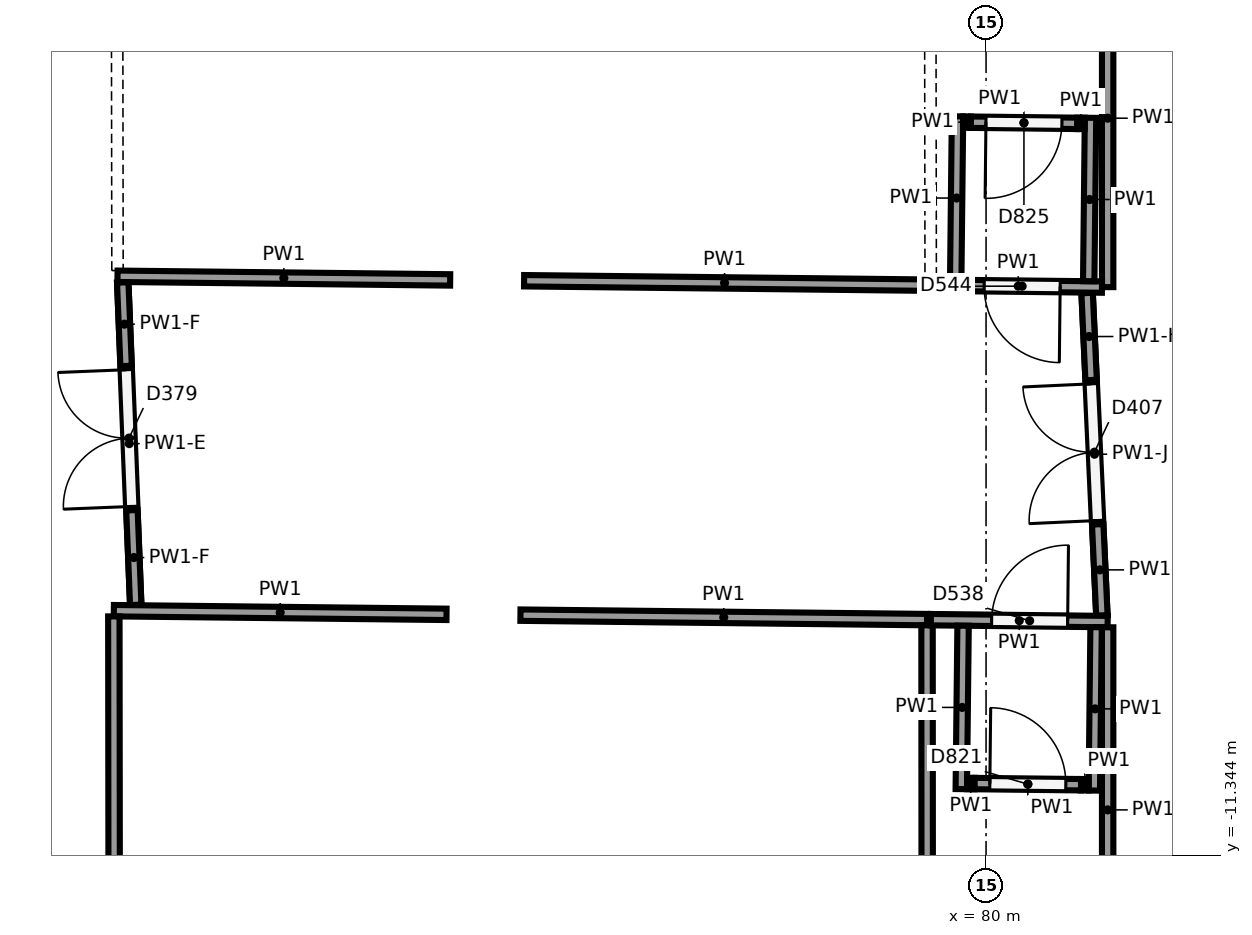
"""IFC4 building model, lengths in metres.
Left out: names, types, materials, properties, quantities, classifications, styles, units other than length and angle.
Written with IfcOpenShell. Run it as: python <this file> out.ifc"""

import sys

from ifc_helpers import new_model, si_unit, direction, frame, frame_2d, origin, origin_2d, place, context, subcontext, project, spatial, rectangle, circle, extrude, element, fill, save


model = new_model("IFC4")
c1 = context("Model", 3, precision=1e-05, world=origin(), true_north=direction((0.0, 1.0)))
c2 = subcontext(c1, "Body", "Model", "MODEL_VIEW")
j1 = project(units=[si_unit("LENGTHUNIT", "METRE"), si_unit("PLANEANGLEUNIT", "RADIAN")], contexts=[c1])
p1 = place(None, origin())
s1 = spatial("IfcSite", under=j1, at=p1, CompositionType="ELEMENT")
p2 = place(p1, origin())
s2 = spatial("IfcBuilding", under=s1, at=p2, CompositionType="ELEMENT")
p3 = place(p2, origin())
s3 = spatial("IfcBuildingStorey", under=s2, at=p3, CompositionType="ELEMENT", Elevation=0.0)
p4 = place(p3, frame((73.498, -5.981, 0.0), z_axis=(0.0, 0.0, 1.0), x_axis=(1.0, 0.0, 0.0)))
e1 = element("IfcColumn", 1, at=p4, inside=s3, PredefinedType="COLUMN", context=c2, shape_type="SweptSolid", body=[
    extrude(circle(Radius=0.45, at=origin_2d()), origin(), (0.0, 0.0, 1.0), 6.5),
])
p5 = place(p3, frame((68.524, -8.127, 0.0), z_axis=(0.0, 0.0, 1.0), x_axis=(0.999940244273, -0.01093196608, 0.0)))
e2 = element("IfcWall", 2, at=p5, inside=s3, PredefinedType="PARTITIONING", context=c2, shape_type="SweptSolid", body=[
    extrude(rectangle(XDim=4.377, YDim=0.15, at=frame_2d((2.188, 0.0))), origin(), (0.0, 0.0, 1.0), 6.15),
])
p6 = place(p3, frame((73.874, -8.186, 0.0), z_axis=(0.0, 0.0, 1.0), x_axis=(0.999939527069, -0.010997372611, 0.0)))
e3 = element("IfcWall", 3, at=p6, inside=s3, PredefinedType="PARTITIONING", context=c2, shape_type="SweptSolid", body=[
    extrude(rectangle(XDim=5.35, YDim=0.15, at=frame_2d((2.675, 0.0))), origin(), (0.0, 0.0, 1.0), 6.15),
])
p7 = place(p3, frame((79.224, -8.319, 0.0), z_axis=(0.0, 0.0, 1.0), x_axis=(0.00057636878, -0.9999998339, 0.0)))
e4 = element("IfcWall", 4, at=p7, inside=s3, PredefinedType="PARTITIONING", context=c2, shape_type="SweptSolid", body=[
    extrude(rectangle(XDim=9.319, YDim=0.15, at=frame_2d((4.659, 0.0))), origin(), (0.0, 0.0, 1.0), 6.15),
])
p8 = place(p3, frame((68.535, -17.298, 0.0), z_axis=(0.0, 0.0, 1.0), x_axis=(-0.001127273963, 0.999999364627, 0.0)))
e5 = element("IfcWall", 5, at=p8, inside=s3, PredefinedType="PARTITIONING", context=c2, shape_type="SweptSolid", body=[
    extrude(rectangle(XDim=9.096, YDim=0.15, at=frame_2d((4.548, 0.0))), origin(), (0.0, 0.0, 1.0), 6.15),
])
p9 = place(p3, frame((79.274, -8.245, 0.0), z_axis=(0.0, 0.0, 1.0), x_axis=(0.999940447056, -0.010913401878, 0.0)))
e6 = element("IfcWall", 6, at=p9, inside=s3, PredefinedType="PARTITIONING", context=c2, shape_type="SweptSolid", body=[
    extrude(rectangle(XDim=2.327, YDim=0.15, at=frame_2d((1.163, 0.0))), origin(), (0.0, 0.0, 1.0), 6.15),
])
p10 = place(p9, frame((0.8, 0.0, 0.0)))
e7 = element("IfcOpeningElement", 7, at=p10, cuts=e6, PredefinedType="OPENING", context=c2, shape_type="SweptSolid", body=[
    extrude(rectangle(XDim=1.0, YDim=2.1, at=frame_2d((0.5, 1.05))), frame((0.0, 0.085, 0.0), z_axis=(0.0, -1.0, 0.0), x_axis=(1.0, 0.0, 0.0)), (0.0, 0.0, 1.0), 0.17),
])
p11 = place(p3, frame((81.6, -8.345, 0.0), z_axis=(0.0, 0.0, 1.0), x_axis=(0.0, -1.0, 0.0)))
e8 = element("IfcWall", 8, at=p11, inside=s3, PredefinedType="PARTITIONING", context=c2, shape_type="SweptSolid", body=[
    extrude(rectangle(XDim=4.805, YDim=0.15, at=frame_2d((2.402, 0.0))), origin(), (0.0, 0.0, 1.0), 6.15),
])
p12 = place(p3, frame((79.258, 5.522, 0.0), z_axis=(0.0, 0.0, 1.0), x_axis=(0.001459586112, -0.999998934804, 0.0)))
e9 = element("IfcWall", 9, at=p12, inside=s3, PredefinedType="PARTITIONING", context=c2, shape_type="SweptSolid", body=[
    extrude(rectangle(XDim=9.367, YDim=0.15, at=frame_2d((4.684, 0.0))), origin(), (0.0, 0.0, 1.0), 6.15),
])
p13 = place(p3, frame((79.197, -3.844, 0.0), z_axis=(0.0, 0.0, 1.0), x_axis=(-0.999939838458, 0.010969022991, 0.0)))
e10 = element("IfcWall", 10, at=p13, inside=s3, PredefinedType="PARTITIONING", context=c2, shape_type="SweptSolid", body=[
    extrude(rectangle(XDim=5.275, YDim=0.15, at=frame_2d((2.637, 0.0))), origin(), (0.0, 0.0, 1.0), 6.15),
])
p14 = place(p3, frame((72.949, -3.775, 0.0), z_axis=(0.0, 0.0, 1.0), x_axis=(-0.999940244273, 0.01093196608, 0.0)))
e11 = element("IfcWall", 11, at=p14, inside=s3, PredefinedType="PARTITIONING", context=c2, shape_type="SweptSolid", body=[
    extrude(rectangle(XDim=4.377, YDim=0.15, at=frame_2d((2.188, 0.0))), origin(), (0.0, 0.0, 1.0), 6.15),
])
p15 = place(p3, frame((68.572, -3.652, 0.0), z_axis=(0.0, 0.0, 1.0), x_axis=(-0.001395372441, 0.999999026467, 0.0)))
e12 = element("IfcWall", 12, at=p15, inside=s3, PredefinedType="PARTITIONING", context=c2, shape_type="SweptSolid", body=[
    extrude(rectangle(XDim=9.098, YDim=0.15, at=frame_2d((4.549, 0.0))), origin(), (0.0, 0.0, 1.0), 6.15),
])
p16 = place(p15, frame((3.95, 0.0, 0.0)))
e13 = element("IfcOpeningElement", 13, at=p16, cuts=e12, PredefinedType="OPENING", context=c2, shape_type="SweptSolid", body=[
    extrude(rectangle(XDim=1.0, YDim=2.1, at=frame_2d((0.5, 1.05))), frame((0.0, 0.085, 0.0), z_axis=(0.0, -1.0, 0.0), x_axis=(1.0, 0.0, 0.0)), (0.0, 0.0, 1.0), 0.17),
])
p17 = place(p3, frame((81.6, 0.575, 0.0), z_axis=(0.0, 0.0, 1.0), x_axis=(0.0, -1.0, 0.0)))
e14 = element("IfcWall", 14, at=p17, inside=s3, PredefinedType="PARTITIONING", context=c2, shape_type="SweptSolid", body=[
    extrude(rectangle(XDim=4.445, YDim=0.15, at=frame_2d((2.223, 0.0))), origin(), (0.0, 0.0, 1.0), 6.15),
])
p18 = place(p3, frame((81.525, -3.869, 0.0), z_axis=(0.0, 0.0, 1.0), x_axis=(-0.999941036186, 0.010859288735, 0.0)))
e15 = element("IfcWall", 15, at=p18, inside=s3, PredefinedType="PARTITIONING", context=c2, shape_type="SweptSolid", body=[
    extrude(rectangle(XDim=2.203, YDim=0.15, at=frame_2d((1.102, 0.0))), origin(), (0.0, 0.0, 1.0), 6.15),
])
p19 = place(p18, frame((0.55, 0.0, 0.0)))
e16 = element("IfcOpeningElement", 16, at=p19, cuts=e15, PredefinedType="OPENING", context=c2, shape_type="SweptSolid", body=[
    extrude(rectangle(XDim=1.0, YDim=2.1, at=frame_2d((0.5, 1.05))), frame((0.0, 0.085, 0.0), z_axis=(0.0, -1.0, 0.0), x_axis=(1.0, 0.0, 0.0)), (0.0, 0.0, 1.0), 0.17),
])
for number, where, z_axis, x_axis in (
    (17, (79.698, -8.324, 0.0), (0.0, 0.0, 1.0), (-0.011, -1.0, 0.0)),
    (18, (81.448, -8.344, 0.0), (0.0, 0.0, 1.0), (-0.011, -1.0, 0.0)),
):
    element("IfcWall", number, at=place(p3, frame(where, z_axis=z_axis, x_axis=x_axis)), inside=s3, PredefinedType="PARTITIONING", context=c2, shape_type="SweptSolid", body=[
        extrude(rectangle(XDim=2.15, YDim=0.15, at=frame_2d((1.075, 0.0))), origin(), (0.0, 0.0, 1.0), 6.15),
    ])
p20 = place(p3, frame((79.75, -10.4, 0.0), z_axis=(0.0, 0.0, 1.0), x_axis=(0.999952412677, -0.009755633294, 0.0)))
e19 = element("IfcWall", 19, at=p20, inside=s3, PredefinedType="PARTITIONING", context=c2, shape_type="SweptSolid", body=[
    extrude(rectangle(XDim=0.1, YDim=0.15, at=frame_2d((0.05, 0.0))), origin(), (0.0, 0.0, 1.0), 6.15),
])
p21 = place(p3, frame((79.85, -10.401, 0.0), z_axis=(0.0, 0.0, 1.0), x_axis=(0.999939647341, -0.010986431424, 0.0)))
e20 = element("IfcWall", 20, at=p21, inside=s3, PredefinedType="PARTITIONING", context=c2, shape_type="SweptSolid", body=[
    extrude(rectangle(XDim=1.4, YDim=0.15, at=frame_2d((0.7, 0.0))), origin(), (0.0, 0.0, 1.0), 6.15),
])
p22 = place(p21, frame((0.2, 0.0, 0.0)))
e21 = element("IfcOpeningElement", 21, at=p22, cuts=e20, PredefinedType="OPENING", context=c2, shape_type="SweptSolid", body=[
    extrude(rectangle(XDim=1.0, YDim=2.1, at=frame_2d((0.5, 1.05))), frame((0.0, 0.085, 0.0), z_axis=(0.0, -1.0, 0.0), x_axis=(1.0, 0.0, 0.0)), (0.0, 0.0, 1.0), 0.17),
])
p23 = place(p3, frame((81.25, -10.417, 0.0), z_axis=(0.0, 0.0, 1.0), x_axis=(0.999925283809, -0.012224025474, 0.0)))
e22 = element("IfcWall", 22, at=p23, inside=s3, PredefinedType="PARTITIONING", context=c2, shape_type="SweptSolid", body=[
    extrude(rectangle(XDim=0.1, YDim=0.15, at=frame_2d((0.05, 0.0))), origin(), (0.0, 0.0, 1.0), 6.15),
])
for number, where, z_axis, x_axis in (
    (23, (81.351, -3.792, 0.0), (0.0, 0.0, 1.0), (0.011, 1.0, 0.0)),
    (24, (79.601, -3.773, 0.0), (0.0, 0.0, 1.0), (0.011, 1.0, 0.0)),
):
    element("IfcWall", number, at=place(p3, frame(where, z_axis=z_axis, x_axis=x_axis)), inside=s3, PredefinedType="PARTITIONING", context=c2, shape_type="SweptSolid", body=[
        extrude(rectangle(XDim=2.15, YDim=0.15, at=frame_2d((1.075, 0.0))), origin(), (0.0, 0.0, 1.0), 6.15),
    ])
p24 = place(p3, frame((81.299, -1.717, 0.0), z_axis=(0.0, 0.0, 1.0), x_axis=(-0.999952412677, 0.009755633294, 0.0)))
e25 = element("IfcWall", 25, at=p24, inside=s3, PredefinedType="PARTITIONING", context=c2, shape_type="SweptSolid", body=[
    extrude(rectangle(XDim=0.1, YDim=0.15, at=frame_2d((0.05, 0.0))), origin(), (0.0, 0.0, 1.0), 6.15),
])
p25 = place(p3, frame((81.198, -1.716, 0.0), z_axis=(0.0, 0.0, 1.0), x_axis=(-0.999939647341, 0.010986431424, 0.0)))
e26 = element("IfcWall", 26, at=p25, inside=s3, PredefinedType="PARTITIONING", context=c2, shape_type="SweptSolid", body=[
    extrude(rectangle(XDim=1.4, YDim=0.15, at=frame_2d((0.7, 0.0))), origin(), (0.0, 0.0, 1.0), 6.15),
])
p26 = place(p25, frame((0.2, 0.0, 0.0)))
e27 = element("IfcOpeningElement", 27, at=p26, cuts=e26, PredefinedType="OPENING", context=c2, shape_type="SweptSolid", body=[
    extrude(rectangle(XDim=1.0, YDim=2.1, at=frame_2d((0.5, 1.05))), frame((0.0, 0.085, 0.0), z_axis=(0.0, -1.0, 0.0), x_axis=(1.0, 0.0, 0.0)), (0.0, 0.0, 1.0), 0.17),
])
p27 = place(p3, frame((79.799, -1.7, 0.0), z_axis=(0.0, 0.0, 1.0), x_axis=(-0.999952412677, 0.009755633294, 0.0)))
e28 = element("IfcWall", 28, at=p27, inside=s3, PredefinedType="PARTITIONING", context=c2, shape_type="SweptSolid", body=[
    extrude(rectangle(XDim=0.1, YDim=0.15, at=frame_2d((0.05, 0.0))), origin(), (0.0, 0.0, 1.0), 6.15),
])
p28 = place(p3, frame((81.524, -8.189, 0.0), z_axis=(0.0, 0.0, 1.0), x_axis=(-0.045764948474, 0.998952235841, 0.0)))
e29 = element("IfcWall", 29, at=p28, inside=s3, PredefinedType="PARTITIONING", context=c2, shape_type="SweptSolid", body=[
    extrude(rectangle(XDim=4.246, YDim=0.15, at=frame_2d((2.123, 0.0))), origin(), (0.0, 0.0, 1.0), 5.05),
])
p29 = place(p28, frame((1.25, 0.0, 0.0)))
e30 = element("IfcOpeningElement", 30, at=p29, cuts=e29, PredefinedType="OPENING", context=c2, shape_type="SweptSolid", body=[
    extrude(rectangle(XDim=1.8, YDim=2.1, at=frame_2d((0.9, 1.05))), frame((0.0, 0.085, 0.0), z_axis=(0.0, -1.0, 0.0), x_axis=(1.0, 0.0, 0.0)), (0.0, 0.0, 1.0), 0.17),
])
p30 = place(p3, frame((81.524, -8.189, 5.05), z_axis=(0.0, 0.0, 1.0), x_axis=(-0.045776808716, 0.998951692418, 0.0)))
e31 = element("IfcWall", 31, at=p30, inside=s3, PredefinedType="PARTITIONING", context=c2, shape_type="SweptSolid", body=[
    extrude(rectangle(XDim=1.2, YDim=0.15, at=frame_2d((0.6, 0.0))), origin(), (0.0, 0.0, 1.0), 1.1),
])
p31 = place(p3, frame((81.382, -5.093, 5.05), z_axis=(0.0, 0.0, 1.0), x_axis=(-0.045784382699, 0.998951345312, 0.0)))
e32 = element("IfcWall", 32, at=p31, inside=s3, PredefinedType="PARTITIONING", context=c2, shape_type="SweptSolid", body=[
    extrude(rectangle(XDim=1.146, YDim=0.15, at=frame_2d((0.573, 0.0))), origin(), (0.0, 0.0, 1.0), 1.1),
])
p32 = place(p3, frame((68.812, -8.05, 0.0), z_axis=(0.0, 0.0, 1.0), x_axis=(-0.040250488261, 0.99918962074, 0.0)))
e33 = element("IfcWall", 33, at=p32, inside=s3, PredefinedType="PARTITIONING", context=c2, shape_type="SweptSolid", body=[
    extrude(rectangle(XDim=4.246, YDim=0.15, at=frame_2d((2.123, 0.0))), origin(), (0.0, 0.0, 1.0), 5.25),
])
p33 = place(p32, frame((1.296, 0.0, 0.0)))
e34 = element("IfcOpeningElement", 34, at=p33, cuts=e33, PredefinedType="OPENING", context=c2, shape_type="SweptSolid", body=[
    extrude(rectangle(XDim=1.8, YDim=2.1, at=frame_2d((0.9, 1.05))), frame((0.0, 0.085, 0.0), z_axis=(0.0, -1.0, 0.0), x_axis=(1.0, 0.0, 0.0)), (0.0, 0.0, 1.0), 0.17),
])
p34 = place(p3, frame((68.686, -4.907, 5.25), z_axis=(0.0, 0.0, 1.0), x_axis=(-0.0401719, 0.999192783426, 0.0)))
e35 = element("IfcWall", 35, at=p34, inside=s3, PredefinedType="PARTITIONING", context=c2, shape_type="SweptSolid", body=[
    extrude(rectangle(XDim=1.1, YDim=0.15, at=frame_2d((0.55, 0.0))), origin(), (0.0, 0.0, 1.0), 0.9),
])
p35 = place(p3, frame((68.812, -8.05, 5.25), z_axis=(0.0, 0.0, 1.0), x_axis=(-0.040171508889, 0.99919279915, 0.0)))
e36 = element("IfcWall", 36, at=p35, inside=s3, PredefinedType="PARTITIONING", context=c2, shape_type="SweptSolid", body=[
    extrude(rectangle(XDim=1.246, YDim=0.15, at=frame_2d((0.623, 0.0))), origin(), (0.0, 0.0, 1.0), 0.9),
])
p36 = place(p10, origin())
e37 = element("IfcDoor", 37, at=p36, inside=s3, OperationType="SINGLE_SWING_RIGHT", PredefinedType="DOOR", context=c2, shape_type="SweptSolid", body=[
    extrude(rectangle(XDim=1.0, YDim=2.1, at=frame_2d((0.5, 1.05))), frame((0.0, 0.025, 0.0), z_axis=(0.0, -1.0, 0.0), x_axis=(1.0, 0.0, 0.0)), (0.0, 0.0, 1.0), 0.05),
])
fill(e7, e37)
p37 = place(p19, origin())
e38 = element("IfcDoor", 38, at=p37, inside=s3, OperationType="SINGLE_SWING_LEFT", PredefinedType="DOOR", context=c2, shape_type="SweptSolid", body=[
    extrude(rectangle(XDim=1.0, YDim=2.1, at=frame_2d((0.5, 1.05))), frame((0.0, 0.025, 0.0), z_axis=(0.0, -1.0, 0.0), x_axis=(1.0, 0.0, 0.0)), (0.0, 0.0, 1.0), 0.05),
])
fill(e16, e38)
p38 = place(p22, origin())
e39 = element("IfcDoor", 39, at=p38, inside=s3, OperationType="SINGLE_SWING_LEFT", PredefinedType="DOOR", context=c2, shape_type="SweptSolid", body=[
    extrude(rectangle(XDim=1.0, YDim=2.1, at=frame_2d((0.5, 1.05))), frame((0.0, 0.025, 0.0), z_axis=(0.0, -1.0, 0.0), x_axis=(1.0, 0.0, 0.0)), (0.0, 0.0, 1.0), 0.05),
])
fill(e21, e39)
p39 = place(p26, origin())
e40 = element("IfcDoor", 40, at=p39, inside=s3, OperationType="SINGLE_SWING_RIGHT", PredefinedType="DOOR", context=c2, shape_type="SweptSolid", body=[
    extrude(rectangle(XDim=1.0, YDim=2.1, at=frame_2d((0.5, 1.05))), frame((0.0, 0.025, 0.0), z_axis=(0.0, -1.0, 0.0), x_axis=(1.0, 0.0, 0.0)), (0.0, 0.0, 1.0), 0.05),
])
fill(e27, e40)
p40 = place(p29, origin())
e41 = element("IfcDoor", 41, at=p40, inside=s3, OperationType="DOUBLE_DOOR_SINGLE_SWING", PredefinedType="DOOR", context=c2, shape_type="SweptSolid", body=[
    extrude(rectangle(XDim=1.8, YDim=2.1, at=frame_2d((0.9, 1.05))), frame((0.0, 0.025, 0.0), z_axis=(0.0, -1.0, 0.0), x_axis=(1.0, 0.0, 0.0)), (0.0, 0.0, 1.0), 0.05),
])
fill(e30, e41)
p41 = place(p33, origin())
e42 = element("IfcDoor", 42, at=p41, inside=s3, OperationType="DOUBLE_DOOR_SINGLE_SWING", PredefinedType="DOOR", context=c2, shape_type="SweptSolid", body=[
    extrude(rectangle(XDim=1.8, YDim=2.1, at=frame_2d((0.9, 1.05))), frame((0.0, 0.025, 0.0), z_axis=(0.0, -1.0, 0.0), x_axis=(1.0, 0.0, 0.0)), (0.0, 0.0, 1.0), 0.05),
])
fill(e34, e42)
save(model, sys.argv[1])
